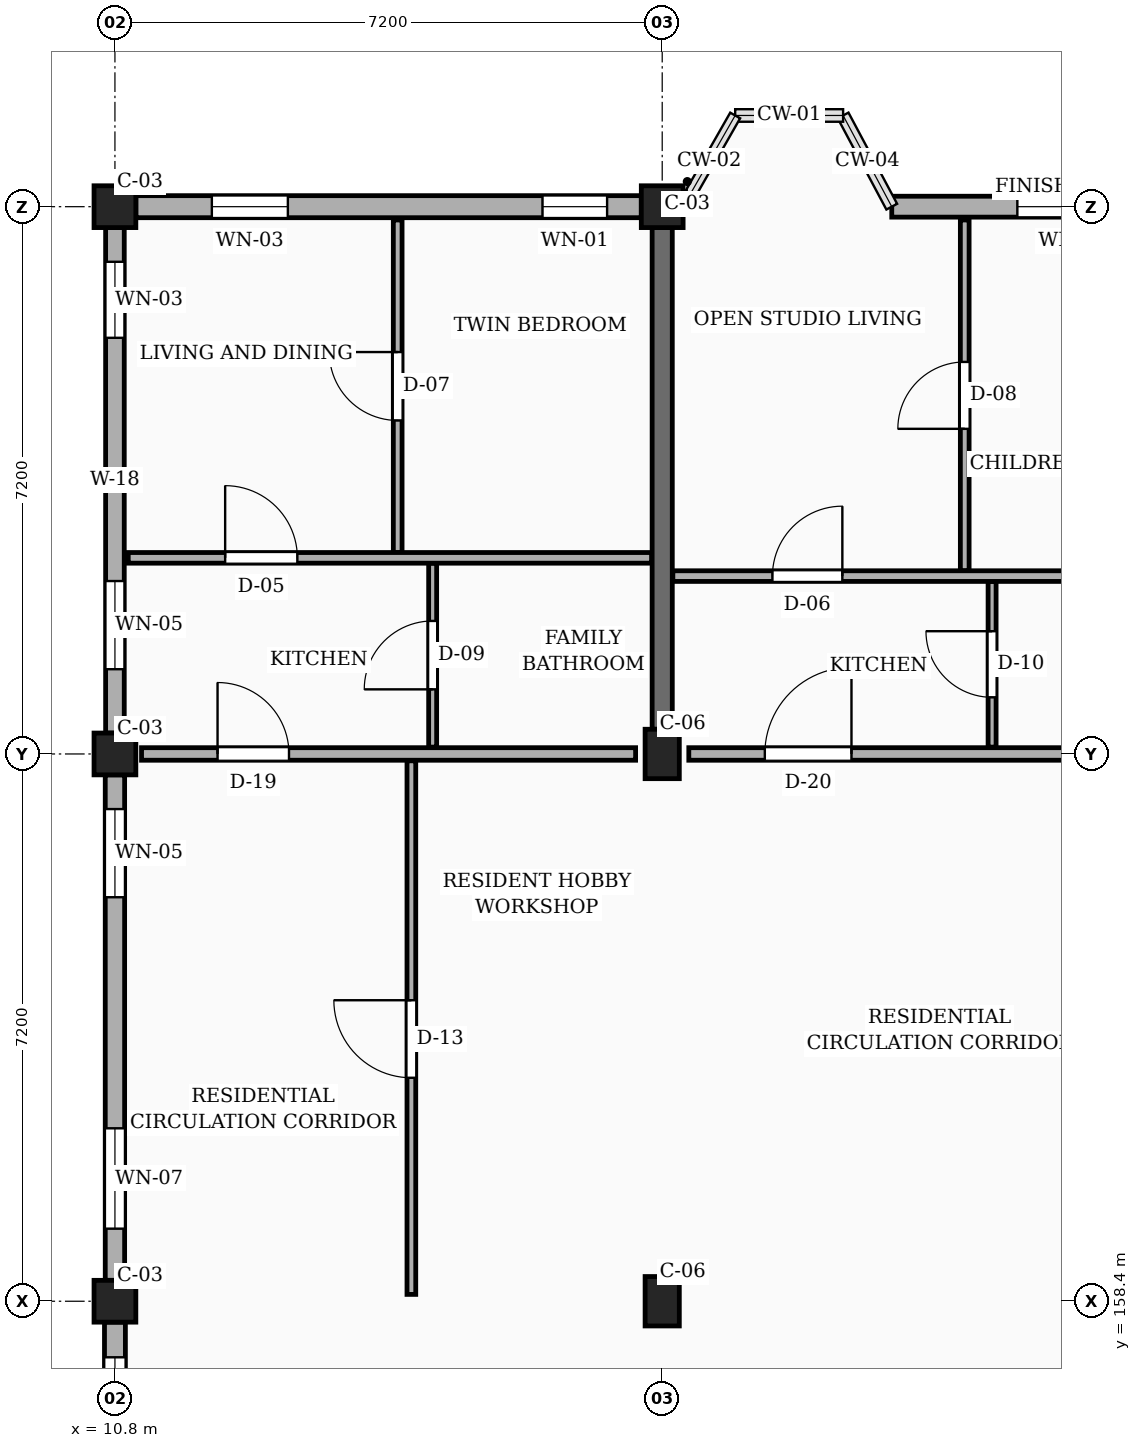
"""IFC4 building model, lengths in metres.
Left out: names, types, materials, properties, quantities, classifications, styles, units other than length and angle.
Written with IfcOpenShell. Run it as: python <this file> out.ifc"""

import sys

from ifc_helpers import new_model, si_unit, direction, frame, frame_2d, origin, origin_2d, place, context, subcontext, project, spatial, rectangle, extrude, element, fill, save


model = new_model("IFC4")
c1 = context("Model", 3, precision=1e-05, world=origin(), true_north=direction((0.0, 1.0)))
c2 = subcontext(c1, "Body", "Model", "MODEL_VIEW")
j1 = project(units=[si_unit("LENGTHUNIT", "METRE"), si_unit("PLANEANGLEUNIT", "RADIAN")], contexts=[c1])
p1 = place(None, origin())
s1 = spatial("IfcSite", under=j1, at=p1, CompositionType="ELEMENT")
p2 = place(p1, origin())
s2 = spatial("IfcBuilding", under=s1, at=p2, CompositionType="ELEMENT")
p3 = place(p2, frame((0.0, 0.0, 10.8)))
s3 = spatial("IfcBuildingStorey", under=s2, at=p3, CompositionType="ELEMENT", Elevation=10.8)
for number, where, z_axis, x_axis in (
    (1, (10.8, 158.4, 0.0), (0.0, 0.0, 1.0), (1.0, 0.0, 0.0)),
    (2, (10.8, 165.6, 0.0), (0.0, 0.0, 1.0), (1.0, 0.0, 0.0)),
    (3, (10.8, 172.8, 0.0), (0.0, 0.0, 1.0), (1.0, 0.0, 0.0)),
):
    element("IfcColumn", number, at=place(p3, frame(where, z_axis=z_axis, x_axis=x_axis)), inside=s3, PredefinedType="COLUMN", context=c2, shape_type="SweptSolid", body=[
        extrude(rectangle(XDim=0.55, YDim=0.55, at=origin_2d()), origin(), (0.0, 0.0, 1.0), 3.15),
    ])
for number, where, z_axis, x_axis in (
    (4, (18.0, 158.4, 0.0), (0.0, 0.0, 1.0), (1.0, 0.0, 0.0)),
    (5, (18.0, 165.6, 0.0), (0.0, 0.0, 1.0), (1.0, 0.0, 0.0)),
):
    element("IfcColumn", number, at=place(p3, frame(where, z_axis=z_axis, x_axis=x_axis)), inside=s3, PredefinedType="COLUMN", context=c2, shape_type="SweptSolid", body=[
        extrude(rectangle(XDim=0.45, YDim=0.65, at=origin_2d()), origin(), (0.0, 0.0, 1.0), 3.15),
    ])
p4 = place(p3, frame((18.0, 172.8, 0.0), z_axis=(0.0, 0.0, 1.0), x_axis=(1.0, 0.0, 0.0)))
e6 = element("IfcColumn", 6, at=p4, inside=s3, PredefinedType="COLUMN", context=c2, shape_type="SweptSolid", body=[
    extrude(rectangle(XDim=0.55, YDim=0.55, at=origin_2d()), origin(), (0.0, 0.0, 1.0), 3.15),
])
p5 = place(p3, frame((18.0, 165.925, 0.0), z_axis=(0.0, 0.0, 1.0), x_axis=(0.0, 1.0, 0.0)))
e7 = element("IfcWall", 7, at=p5, inside=s3, PredefinedType="SOLIDWALL", context=c2, shape_type="SweptSolid", body=[
    extrude(rectangle(XDim=6.6, YDim=0.265, at=frame_2d((3.3, 0.0))), origin(), (0.0, 0.0, 1.0), 2.185),
])
p6 = place(p3, frame((24.925, 172.8, 0.0), z_axis=(0.0, 0.0, 1.0), x_axis=(-1.0, 0.0, 0.0)))
e8 = element("IfcWall", 8, at=p6, inside=s3, PredefinedType="SOLIDWALL", context=c2, shape_type="SweptSolid", body=[
    extrude(rectangle(XDim=3.905, YDim=0.275, at=frame_2d((1.953, 0.0))), origin(), (0.0, 0.0, 1.0), 2.455),
])
p7 = place(p6, frame((0.802, 0.0, 0.78)))
e9 = element("IfcOpeningElement", 9, at=p7, cuts=e8, PredefinedType="OPENING", context=c2, shape_type="SweptSolid", body=[
    extrude(rectangle(XDim=1.45, YDim=1.44, at=frame_2d((0.725, 0.72))), frame((0.0, 0.147, 0.0), z_axis=(0.0, -1.0, 0.0), x_axis=(1.0, 0.0, 0.0)), (0.0, 0.0, 1.0), 0.295),
])
p8 = place(p3, frame((17.725, 172.8, 0.0), z_axis=(0.0, 0.0, 1.0), x_axis=(-1.0, 0.0, 0.0)))
e10 = element("IfcWall", 10, at=p8, inside=s3, PredefinedType="SOLIDWALL", context=c2, shape_type="SweptSolid", body=[
    extrude(rectangle(XDim=6.65, YDim=0.29, at=frame_2d((3.325, 0.0))), origin(), (0.0, 0.0, 1.0), 2.455),
])
p9 = place(p8, frame((0.45, 0.0, 0.78)))
e11 = element("IfcOpeningElement", 11, at=p9, cuts=e10, PredefinedType="OPENING", context=c2, shape_type="SweptSolid", body=[
    extrude(rectangle(XDim=0.85, YDim=1.15, at=frame_2d((0.425, 0.575))), frame((0.0, 0.155, 0.0), z_axis=(0.0, -1.0, 0.0), x_axis=(1.0, 0.0, 0.0)), (0.0, 0.0, 1.0), 0.31),
])
p10 = place(p8, frame((4.65, 0.0, 0.78)))
e12 = element("IfcOpeningElement", 12, at=p10, cuts=e10, PredefinedType="OPENING", context=c2, shape_type="SweptSolid", body=[
    extrude(rectangle(XDim=1.0, YDim=1.15, at=frame_2d((0.5, 0.575))), frame((0.0, 0.155, 0.0), z_axis=(0.0, -1.0, 0.0), x_axis=(1.0, 0.0, 0.0)), (0.0, 0.0, 1.0), 0.31),
])
p11 = place(p3, frame((10.8, 172.525, 0.0), z_axis=(0.0, 0.0, 1.0), x_axis=(0.0, -1.0, 0.0)))
e13 = element("IfcWall", 13, at=p11, inside=s3, PredefinedType="SOLIDWALL", context=c2, shape_type="SweptSolid", body=[
    extrude(rectangle(XDim=6.65, YDim=0.245, at=frame_2d((3.325, 0.0))), origin(), (0.0, 0.0, 1.0), 2.455),
])
p12 = place(p11, frame((0.45, 0.0, 0.78)))
e14 = element("IfcOpeningElement", 14, at=p12, cuts=e13, PredefinedType="OPENING", context=c2, shape_type="SweptSolid", body=[
    extrude(rectangle(XDim=1.0, YDim=1.15, at=frame_2d((0.5, 0.575))), frame((0.0, 0.133, 0.0), z_axis=(0.0, -1.0, 0.0), x_axis=(1.0, 0.0, 0.0)), (0.0, 0.0, 1.0), 0.265),
])
p13 = place(p11, frame((4.65, 0.0, 0.78)))
e15 = element("IfcOpeningElement", 15, at=p13, cuts=e13, PredefinedType="OPENING", context=c2, shape_type="SweptSolid", body=[
    extrude(rectangle(XDim=1.16, YDim=1.15, at=frame_2d((0.58, 0.575))), frame((0.0, 0.133, 0.0), z_axis=(0.0, -1.0, 0.0), x_axis=(1.0, 0.0, 0.0)), (0.0, 0.0, 1.0), 0.265),
])
p14 = place(p3, frame((10.8, 165.325, 0.0), z_axis=(0.0, 0.0, 1.0), x_axis=(0.0, -1.0, 0.0)))
e16 = element("IfcWall", 16, at=p14, inside=s3, PredefinedType="SOLIDWALL", context=c2, shape_type="SweptSolid", body=[
    extrude(rectangle(XDim=6.65, YDim=0.255, at=frame_2d((3.325, 0.0))), origin(), (0.0, 0.0, 1.0), 2.455),
])
p15 = place(p14, frame((0.45, 0.0, 0.78)))
e17 = element("IfcOpeningElement", 17, at=p15, cuts=e16, PredefinedType="OPENING", context=c2, shape_type="SweptSolid", body=[
    extrude(rectangle(XDim=1.16, YDim=1.15, at=frame_2d((0.58, 0.575))), frame((0.0, 0.137, 0.0), z_axis=(0.0, -1.0, 0.0), x_axis=(1.0, 0.0, 0.0)), (0.0, 0.0, 1.0), 0.275),
])
p16 = place(p14, frame((4.65, 0.0, 0.78)))
e18 = element("IfcOpeningElement", 18, at=p16, cuts=e16, PredefinedType="OPENING", context=c2, shape_type="SweptSolid", body=[
    extrude(rectangle(XDim=1.32, YDim=1.15, at=frame_2d((0.66, 0.575))), frame((0.0, 0.137, 0.0), z_axis=(0.0, -1.0, 0.0), x_axis=(1.0, 0.0, 0.0)), (0.0, 0.0, 1.0), 0.275),
])
p17 = place(p3, frame((10.8, 158.125, 0.0), z_axis=(0.0, 0.0, 1.0), x_axis=(0.0, -1.0, 0.0)))
e19 = element("IfcWall", 19, at=p17, inside=s3, PredefinedType="SOLIDWALL", context=c2, shape_type="SweptSolid", body=[
    extrude(rectangle(XDim=6.65, YDim=0.275, at=frame_2d((3.325, 0.0))), origin(), (0.0, 0.0, 1.0), 2.455),
])
p18 = place(p17, frame((0.462, 0.0, 0.78)))
e20 = element("IfcOpeningElement", 20, at=p18, cuts=e19, PredefinedType="OPENING", context=c2, shape_type="SweptSolid", body=[
    extrude(rectangle(XDim=1.04, YDim=1.26, at=frame_2d((0.52, 0.63))), frame((0.0, 0.147, 0.0), z_axis=(0.0, -1.0, 0.0), x_axis=(1.0, 0.0, 0.0)), (0.0, 0.0, 1.0), 0.295),
])
p19 = place(p17, frame((3.728, 0.0, 0.78)))
e21 = element("IfcOpeningElement", 21, at=p19, cuts=e19, PredefinedType="OPENING", context=c2, shape_type="SweptSolid", body=[
    extrude(rectangle(XDim=0.88, YDim=1.26, at=frame_2d((0.44, 0.63))), frame((0.0, 0.147, 0.0), z_axis=(0.0, -1.0, 0.0), x_axis=(1.0, 0.0, 0.0)), (0.0, 0.0, 1.0), 0.295),
])
p20 = place(p3, frame((11.15, 165.6, 0.0), z_axis=(0.0, 0.0, 1.0), x_axis=(1.0, 0.0, 0.0)))
e22 = element("IfcWall", 22, at=p20, inside=s3, PredefinedType="PARTITIONING", context=c2, shape_type="SweptSolid", body=[
    extrude(rectangle(XDim=6.5, YDim=0.165, at=frame_2d((3.25, 0.0))), origin(), (0.0, 0.0, 1.0), 2.235),
])
p21 = place(p20, frame((1.0, 0.0, 0.0)))
e23 = element("IfcOpeningElement", 23, at=p21, cuts=e22, PredefinedType="OPENING", context=c2, shape_type="SweptSolid", body=[
    extrude(rectangle(XDim=0.94, YDim=2.12, at=frame_2d((0.47, 1.06))), frame((0.0, 0.093, 0.0), z_axis=(0.0, -1.0, 0.0), x_axis=(1.0, 0.0, 0.0)), (0.0, 0.0, 1.0), 0.185),
])
p22 = place(p3, frame((18.35, 165.6, 0.0), z_axis=(0.0, 0.0, 1.0), x_axis=(1.0, 0.0, 0.0)))
e24 = element("IfcWall", 24, at=p22, inside=s3, PredefinedType="PARTITIONING", context=c2, shape_type="SweptSolid", body=[
    extrude(rectangle(XDim=6.5, YDim=0.165, at=frame_2d((3.25, 0.0))), origin(), (0.0, 0.0, 1.0), 2.235),
])
p23 = place(p22, frame((1.0, 0.0, 0.0)))
e25 = element("IfcOpeningElement", 25, at=p23, cuts=e24, PredefinedType="OPENING", context=c2, shape_type="SweptSolid", body=[
    extrude(rectangle(XDim=1.14, YDim=2.18, at=frame_2d((0.57, 1.09))), frame((0.0, 0.093, 0.0), z_axis=(0.0, -1.0, 0.0), x_axis=(1.0, 0.0, 0.0)), (0.0, 0.0, 1.0), 0.185),
])
p24 = place(p3, frame((14.7, 158.49, 0.0), z_axis=(0.0, 0.0, 1.0), x_axis=(0.0, 1.0, 0.0)))
e26 = element("IfcWall", 26, at=p24, inside=s3, PredefinedType="PARTITIONING", context=c2, shape_type="SweptSolid", body=[
    extrude(rectangle(XDim=7.02, YDim=0.115, at=frame_2d((3.51, 0.0))), origin(), (0.0, 0.0, 1.0), 2.32),
])
p25 = place(p24, frame((2.85, 0.0, 0.0)))
e27 = element("IfcOpeningElement", 27, at=p25, cuts=e26, PredefinedType="OPENING", context=c2, shape_type="SweptSolid", body=[
    extrude(rectangle(XDim=1.02, YDim=2.15, at=frame_2d((0.51, 1.075))), frame((0.0, 0.067, 0.0), z_axis=(0.0, -1.0, 0.0), x_axis=(1.0, 0.0, 0.0)), (0.0, 0.0, 1.0), 0.135),
])
p26 = place(p3, frame((14.52, 168.25, 0.0), z_axis=(0.0, 0.0, 1.0), x_axis=(0.0, 1.0, 0.0)))
e28 = element("IfcWall", 28, at=p26, inside=s3, PredefinedType="PARTITIONING", context=c2, shape_type="SweptSolid", body=[
    extrude(rectangle(XDim=4.375, YDim=0.115, at=frame_2d((2.188, 0.0))), origin(), (0.0, 0.0, 1.0), 2.32),
])
p27 = place(p26, frame((1.738, 0.0, 0.0)))
e29 = element("IfcOpeningElement", 29, at=p27, cuts=e28, PredefinedType="OPENING", context=c2, shape_type="SweptSolid", body=[
    extrude(rectangle(XDim=0.9, YDim=2.1, at=frame_2d((0.45, 1.05))), frame((0.0, 0.067, 0.0), z_axis=(0.0, -1.0, 0.0), x_axis=(1.0, 0.0, 0.0)), (0.0, 0.0, 1.0), 0.135),
])
p28 = place(p3, frame((14.98, 165.69, 0.0), z_axis=(0.0, 0.0, 1.0), x_axis=(0.0, 1.0, 0.0)))
e30 = element("IfcWall", 30, at=p28, inside=s3, PredefinedType="PARTITIONING", context=c2, shape_type="SweptSolid", body=[
    extrude(rectangle(XDim=2.42, YDim=0.105, at=frame_2d((1.21, 0.0))), origin(), (0.0, 0.0, 1.0), 2.32),
])
p29 = place(p28, frame((0.76, 0.0, 0.0)))
e31 = element("IfcOpeningElement", 31, at=p29, cuts=e30, PredefinedType="OPENING", context=c2, shape_type="SweptSolid", body=[
    extrude(rectangle(XDim=0.9, YDim=2.05, at=frame_2d((0.45, 1.025))), frame((0.0, 0.062, 0.0), z_axis=(0.0, -1.0, 0.0), x_axis=(1.0, 0.0, 0.0)), (0.0, 0.0, 1.0), 0.125),
])
p30 = place(p3, frame((10.975, 168.18, 0.0), z_axis=(0.0, 0.0, 1.0), x_axis=(1.0, 0.0, 0.0)))
e32 = element("IfcWall", 32, at=p30, inside=s3, PredefinedType="PARTITIONING", context=c2, shape_type="SweptSolid", body=[
    extrude(rectangle(XDim=6.885, YDim=0.14, at=frame_2d((3.442, 0.0))), origin(), (0.0, 0.0, 1.0), 2.32),
])
p31 = place(p30, frame((1.275, 0.0, 0.0)))
e33 = element("IfcOpeningElement", 33, at=p31, cuts=e32, PredefinedType="OPENING", context=c2, shape_type="SweptSolid", body=[
    extrude(rectangle(XDim=0.95, YDim=2.1, at=frame_2d((0.475, 1.05))), frame((0.0, 0.08, 0.0), z_axis=(0.0, -1.0, 0.0), x_axis=(1.0, 0.0, 0.0)), (0.0, 0.0, 1.0), 0.16),
])
p32 = place(p3, frame((21.98, 168.01, 0.0), z_axis=(0.0, 0.0, 1.0), x_axis=(0.0, 1.0, 0.0)))
e34 = element("IfcWall", 34, at=p32, inside=s3, PredefinedType="PARTITIONING", context=c2, shape_type="SweptSolid", body=[
    extrude(rectangle(XDim=4.615, YDim=0.115, at=frame_2d((2.308, 0.0))), origin(), (0.0, 0.0, 1.0), 2.32),
])
p33 = place(p32, frame((1.867, 0.0, 0.0)))
e35 = element("IfcOpeningElement", 35, at=p33, cuts=e34, PredefinedType="OPENING", context=c2, shape_type="SweptSolid", body=[
    extrude(rectangle(XDim=0.88, YDim=2.08, at=frame_2d((0.44, 1.04))), frame((0.0, 0.067, 0.0), z_axis=(0.0, -1.0, 0.0), x_axis=(1.0, 0.0, 0.0)), (0.0, 0.0, 1.0), 0.135),
])
p34 = place(p3, frame((22.34, 165.69, 0.0), z_axis=(0.0, 0.0, 1.0), x_axis=(0.0, 1.0, 0.0)))
e36 = element("IfcWall", 36, at=p34, inside=s3, PredefinedType="PARTITIONING", context=c2, shape_type="SweptSolid", body=[
    extrude(rectangle(XDim=2.18, YDim=0.105, at=frame_2d((1.09, 0.0))), origin(), (0.0, 0.0, 1.0), 2.32),
])
p35 = place(p34, frame((0.655, 0.0, 0.0)))
e37 = element("IfcOpeningElement", 37, at=p35, cuts=e36, PredefinedType="OPENING", context=c2, shape_type="SweptSolid", body=[
    extrude(rectangle(XDim=0.87, YDim=2.05, at=frame_2d((0.435, 1.025))), frame((0.0, 0.062, 0.0), z_axis=(0.0, -1.0, 0.0), x_axis=(1.0, 0.0, 0.0)), (0.0, 0.0, 1.0), 0.125),
])
p36 = place(p3, frame((18.14, 167.94, 0.0), z_axis=(0.0, 0.0, 1.0), x_axis=(1.0, 0.0, 0.0)))
e38 = element("IfcWall", 38, at=p36, inside=s3, PredefinedType="PARTITIONING", context=c2, shape_type="SweptSolid", body=[
    extrude(rectangle(XDim=6.92, YDim=0.14, at=frame_2d((3.46, 0.0))), origin(), (0.0, 0.0, 1.0), 2.32),
])
p37 = place(p36, frame((1.31, 0.0, 0.0)))
e39 = element("IfcOpeningElement", 39, at=p37, cuts=e38, PredefinedType="OPENING", context=c2, shape_type="SweptSolid", body=[
    extrude(rectangle(XDim=0.92, YDim=2.1, at=frame_2d((0.46, 1.05))), frame((0.0, 0.08, 0.0), z_axis=(0.0, -1.0, 0.0), x_axis=(1.0, 0.0, 0.0)), (0.0, 0.0, 1.0), 0.16),
])
p38 = place(p7, origin())
e40 = element("IfcWindow", 40, at=p38, inside=s3, PartitioningType="SINGLE_PANEL", PredefinedType="WINDOW", context=c2, shape_type="SweptSolid", body=[
    extrude(rectangle(XDim=1.45, YDim=1.44, at=frame_2d((0.725, 0.72))), frame((0.0, 0.03, 0.0), z_axis=(0.0, -1.0, 0.0), x_axis=(1.0, 0.0, 0.0)), (0.0, 0.0, 1.0), 0.06),
])
fill(e9, e40)
p39 = place(p9, origin())
e41 = element("IfcWindow", 41, at=p39, inside=s3, PartitioningType="SINGLE_PANEL", PredefinedType="WINDOW", context=c2, shape_type="SweptSolid", body=[
    extrude(rectangle(XDim=0.85, YDim=1.15, at=frame_2d((0.425, 0.575))), frame((0.0, 0.03, 0.0), z_axis=(0.0, -1.0, 0.0), x_axis=(1.0, 0.0, 0.0)), (0.0, 0.0, 1.0), 0.06),
])
fill(e11, e41)
p40 = place(p10, origin())
e42 = element("IfcWindow", 42, at=p40, inside=s3, PartitioningType="SINGLE_PANEL", PredefinedType="WINDOW", context=c2, shape_type="SweptSolid", body=[
    extrude(rectangle(XDim=1.0, YDim=1.15, at=frame_2d((0.5, 0.575))), frame((0.0, 0.03, 0.0), z_axis=(0.0, -1.0, 0.0), x_axis=(1.0, 0.0, 0.0)), (0.0, 0.0, 1.0), 0.06),
])
fill(e12, e42)
p41 = place(p12, origin())
e43 = element("IfcWindow", 43, at=p41, inside=s3, PartitioningType="SINGLE_PANEL", PredefinedType="WINDOW", context=c2, shape_type="SweptSolid", body=[
    extrude(rectangle(XDim=1.0, YDim=1.15, at=frame_2d((0.5, 0.575))), frame((0.0, 0.03, 0.0), z_axis=(0.0, -1.0, 0.0), x_axis=(1.0, 0.0, 0.0)), (0.0, 0.0, 1.0), 0.06),
])
fill(e14, e43)
p42 = place(p13, origin())
e44 = element("IfcWindow", 44, at=p42, inside=s3, PartitioningType="SINGLE_PANEL", PredefinedType="WINDOW", context=c2, shape_type="SweptSolid", body=[
    extrude(rectangle(XDim=1.16, YDim=1.15, at=frame_2d((0.58, 0.575))), frame((0.0, 0.03, 0.0), z_axis=(0.0, -1.0, 0.0), x_axis=(1.0, 0.0, 0.0)), (0.0, 0.0, 1.0), 0.06),
])
fill(e15, e44)
p43 = place(p15, origin())
e45 = element("IfcWindow", 45, at=p43, inside=s3, PartitioningType="SINGLE_PANEL", PredefinedType="WINDOW", context=c2, shape_type="SweptSolid", body=[
    extrude(rectangle(XDim=1.16, YDim=1.15, at=frame_2d((0.58, 0.575))), frame((0.0, 0.03, 0.0), z_axis=(0.0, -1.0, 0.0), x_axis=(1.0, 0.0, 0.0)), (0.0, 0.0, 1.0), 0.06),
])
fill(e17, e45)
p44 = place(p16, origin())
e46 = element("IfcWindow", 46, at=p44, inside=s3, PartitioningType="SINGLE_PANEL", PredefinedType="WINDOW", context=c2, shape_type="SweptSolid", body=[
    extrude(rectangle(XDim=1.32, YDim=1.15, at=frame_2d((0.66, 0.575))), frame((0.0, 0.03, 0.0), z_axis=(0.0, -1.0, 0.0), x_axis=(1.0, 0.0, 0.0)), (0.0, 0.0, 1.0), 0.06),
])
fill(e18, e46)
p45 = place(p18, origin())
e47 = element("IfcWindow", 47, at=p45, inside=s3, PartitioningType="SINGLE_PANEL", PredefinedType="WINDOW", context=c2, shape_type="SweptSolid", body=[
    extrude(rectangle(XDim=1.04, YDim=1.26, at=frame_2d((0.52, 0.63))), frame((0.0, 0.03, 0.0), z_axis=(0.0, -1.0, 0.0), x_axis=(1.0, 0.0, 0.0)), (0.0, 0.0, 1.0), 0.06),
])
fill(e20, e47)
p46 = place(p21, origin())
e48 = element("IfcDoor", 48, at=p46, inside=s3, OperationType="SINGLE_SWING_LEFT", PredefinedType="DOOR", context=c2, shape_type="SweptSolid", body=[
    extrude(rectangle(XDim=0.94, YDim=2.12, at=frame_2d((0.47, 1.06))), frame((0.0, 0.025, 0.0), z_axis=(0.0, -1.0, 0.0), x_axis=(1.0, 0.0, 0.0)), (0.0, 0.0, 1.0), 0.05),
])
fill(e23, e48)
p47 = place(p23, origin())
e49 = element("IfcDoor", 49, at=p47, inside=s3, OperationType="SINGLE_SWING_RIGHT", PredefinedType="DOOR", context=c2, shape_type="SweptSolid", body=[
    extrude(rectangle(XDim=1.14, YDim=2.18, at=frame_2d((0.57, 1.09))), frame((0.0, 0.025, 0.0), z_axis=(0.0, -1.0, 0.0), x_axis=(1.0, 0.0, 0.0)), (0.0, 0.0, 1.0), 0.05),
])
fill(e25, e49)
p48 = place(p25, origin())
e50 = element("IfcDoor", 50, at=p48, inside=s3, OperationType="SINGLE_SWING_RIGHT", PredefinedType="DOOR", context=c2, shape_type="SweptSolid", body=[
    extrude(rectangle(XDim=1.02, YDim=2.15, at=frame_2d((0.51, 1.075))), frame((0.0, 0.025, 0.0), z_axis=(0.0, -1.0, 0.0), x_axis=(1.0, 0.0, 0.0)), (0.0, 0.0, 1.0), 0.05),
])
fill(e27, e50)
p49 = place(p27, origin())
e51 = element("IfcDoor", 51, at=p49, inside=s3, OperationType="SINGLE_SWING_RIGHT", PredefinedType="DOOR", context=c2, shape_type="SweptSolid", body=[
    extrude(rectangle(XDim=0.9, YDim=2.1, at=frame_2d((0.45, 1.05))), frame((0.0, 0.025, 0.0), z_axis=(0.0, -1.0, 0.0), x_axis=(1.0, 0.0, 0.0)), (0.0, 0.0, 1.0), 0.05),
])
fill(e29, e51)
p50 = place(p29, origin())
e52 = element("IfcDoor", 52, at=p50, inside=s3, OperationType="SINGLE_SWING_LEFT", PredefinedType="DOOR", context=c2, shape_type="SweptSolid", body=[
    extrude(rectangle(XDim=0.9, YDim=2.05, at=frame_2d((0.45, 1.025))), frame((0.0, 0.025, 0.0), z_axis=(0.0, -1.0, 0.0), x_axis=(1.0, 0.0, 0.0)), (0.0, 0.0, 1.0), 0.05),
])
fill(e31, e52)
p51 = place(p31, origin())
e53 = element("IfcDoor", 53, at=p51, inside=s3, OperationType="SINGLE_SWING_LEFT", PredefinedType="DOOR", context=c2, shape_type="SweptSolid", body=[
    extrude(rectangle(XDim=0.95, YDim=2.1, at=frame_2d((0.475, 1.05))), frame((0.0, 0.025, 0.0), z_axis=(0.0, -1.0, 0.0), x_axis=(1.0, 0.0, 0.0)), (0.0, 0.0, 1.0), 0.05),
])
fill(e33, e53)
p52 = place(p33, origin())
e54 = element("IfcDoor", 54, at=p52, inside=s3, OperationType="SINGLE_SWING_LEFT", PredefinedType="DOOR", context=c2, shape_type="SweptSolid", body=[
    extrude(rectangle(XDim=0.88, YDim=2.08, at=frame_2d((0.44, 1.04))), frame((0.0, 0.025, 0.0), z_axis=(0.0, -1.0, 0.0), x_axis=(1.0, 0.0, 0.0)), (0.0, 0.0, 1.0), 0.05),
])
fill(e35, e54)
p53 = place(p35, origin())
e55 = element("IfcDoor", 55, at=p53, inside=s3, OperationType="SINGLE_SWING_RIGHT", PredefinedType="DOOR", context=c2, shape_type="SweptSolid", body=[
    extrude(rectangle(XDim=0.87, YDim=2.05, at=frame_2d((0.435, 1.025))), frame((0.0, 0.025, 0.0), z_axis=(0.0, -1.0, 0.0), x_axis=(1.0, 0.0, 0.0)), (0.0, 0.0, 1.0), 0.05),
])
fill(e37, e55)
p54 = place(p37, origin())
e56 = element("IfcDoor", 56, at=p54, inside=s3, OperationType="SINGLE_SWING_RIGHT", PredefinedType="DOOR", context=c2, shape_type="SweptSolid", body=[
    extrude(rectangle(XDim=0.92, YDim=2.1, at=frame_2d((0.46, 1.05))), frame((0.0, 0.025, 0.0), z_axis=(0.0, -1.0, 0.0), x_axis=(1.0, 0.0, 0.0)), (0.0, 0.0, 1.0), 0.05),
])
fill(e39, e56)
save(model, sys.argv[1])
